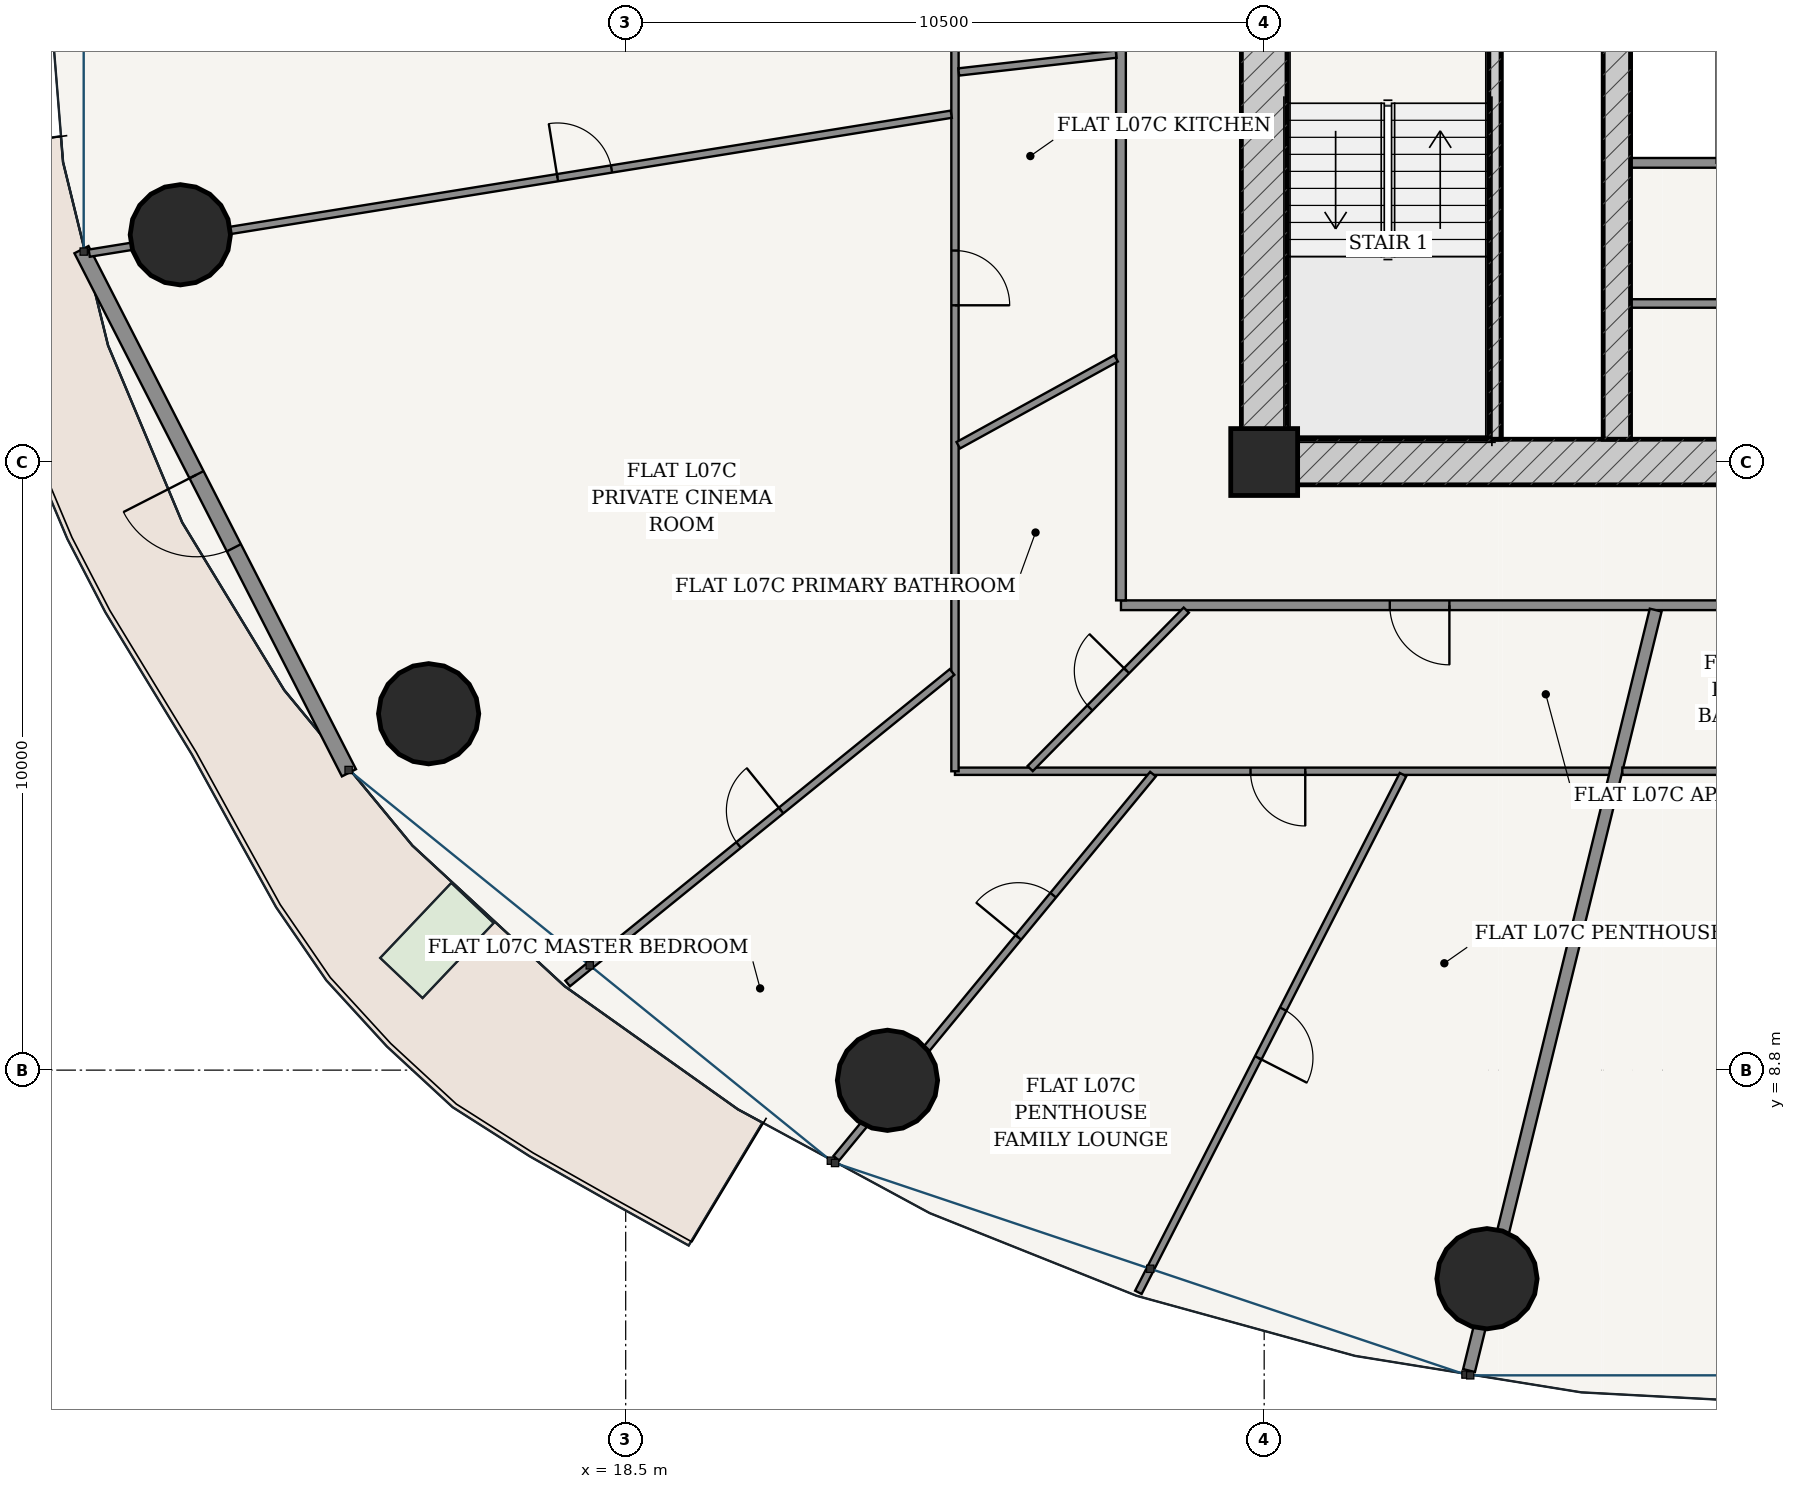
"""IFC4 building model, lengths in metres.
Left out: names, types, materials, properties, quantities, classifications, styles, units other than length and angle.
Written with IfcOpenShell. Run it as: python <this file> out.ifc"""

import sys

from ifc_helpers import new_model, si_unit, direction, frame, frame_2d, origin, origin_2d, place, context, subcontext, project, spatial, rectangle, hollow_circle, extrude, source, transform, mapped, element, fill, save


model = new_model("IFC4")
c1 = context("Model", 3, precision=1e-05, world=origin(), true_north=direction((-0.2419218956, 0.970295726276)))
c2 = subcontext(c1, "Body", "Model", "MODEL_VIEW")
j1 = project(units=[si_unit("LENGTHUNIT", "METRE"), si_unit("PLANEANGLEUNIT", "RADIAN")], contexts=[c1])
p1 = place(None, origin())
s1 = spatial("IfcSite", under=j1, at=p1, CompositionType="ELEMENT")
p2 = place(p1, origin())
s2 = spatial("IfcBuilding", under=s1, at=p2, CompositionType="ELEMENT")
p3 = place(p2, frame((0.0, 0.0, 31.2)))
s3 = spatial("IfcBuildingStorey", under=s2, at=p3, CompositionType="ELEMENT", Elevation=31.2)
p4 = place(p3, frame((29.0, 18.8, 0.0), z_axis=(0.0, 0.0, 1.0), x_axis=(1.0, 0.0, 0.0)))
e1 = element("IfcColumn", 1, at=p4, inside=s3, PredefinedType="COLUMN", context=c2, shape_type="SweptSolid", body=[
    extrude(rectangle(XDim=1.1, YDim=1.1, at=origin_2d()), origin(), (0.0, 0.0, 1.0), 3.6),
])
p5 = place(p3, frame((28.625, 18.8, 0.0), z_axis=(0.0, 0.0, 1.0), x_axis=(1.0, 0.0, 0.0)))
e2 = element("IfcWall", 2, at=p5, inside=s3, PredefinedType="SHEAR", context=c2, shape_type="SweptSolid", body=[
    extrude(rectangle(XDim=18.75, YDim=0.75, at=frame_2d((9.375, 0.0))), origin(), (0.0, 0.0, 1.0), 3.32),
])
p6 = place(p5, frame((8.95, 0.0, 0.0)))
e3 = element("IfcOpeningElement", 3, at=p6, cuts=e2, PredefinedType="OPENING", context=c2, shape_type="SweptSolid", body=[
    extrude(rectangle(XDim=0.85, YDim=2.1, at=frame_2d((0.425, 1.05))), frame((0.0, 0.385, 0.0), z_axis=(0.0, -1.0, 0.0), x_axis=(1.0, 0.0, 0.0)), (0.0, 0.0, 1.0), 0.77),
])
p7 = place(p3, frame((29.0, 19.175, 0.0), z_axis=(0.0, 0.0, 1.0), x_axis=(0.0, 1.0, 0.0)))
e4 = element("IfcWall", 4, at=p7, inside=s3, PredefinedType="SHEAR", context=c2, shape_type="SweptSolid", body=[
    extrude(rectangle(XDim=15.25, YDim=0.75, at=frame_2d((7.625, 0.0))), origin(), (0.0, 0.0, 1.0), 3.32),
])
p8 = place(p7, frame((9.875, 0.0, 0.0)))
e5 = element("IfcOpeningElement", 5, at=p8, cuts=e4, PredefinedType="OPENING", context=c2, shape_type="SweptSolid", body=[
    extrude(rectangle(XDim=1.5, YDim=2.2, at=frame_2d((0.75, 1.1))), frame((0.0, 0.385, 0.0), z_axis=(0.0, -1.0, 0.0), x_axis=(1.0, 0.0, 0.0)), (0.0, 0.0, 1.0), 0.77),
])
p9 = place(p3, frame((32.795, 19.175, 0.0), z_axis=(0.0, 0.0, 1.0), x_axis=(0.0, 1.0, 0.0)))
e6 = element("IfcWall", 6, at=p9, inside=s3, PredefinedType="SOLIDWALL", context=c2, shape_type="SweptSolid", body=[
    extrude(rectangle(XDim=7.375, YDim=0.2, at=frame_2d((3.688, 0.0))), origin(), (0.0, 0.0, 1.0), 3.32),
])
p10 = place(p3, frame((34.8, 19.175, 0.0), z_axis=(0.0, 0.0, 1.0), x_axis=(0.0, 1.0, 0.0)))
e7 = element("IfcWall", 7, at=p10, inside=s3, PredefinedType="SHEAR", context=c2, shape_type="SweptSolid", body=[
    extrude(rectangle(XDim=15.25, YDim=0.45, at=frame_2d((7.625, 0.0))), origin(), (0.0, 0.0, 1.0), 3.32),
])
p11 = place(p10, frame((7.8, 0.0, 0.0)))
e8 = element("IfcOpeningElement", 8, at=p11, cuts=e7, PredefinedType="OPENING", context=c2, shape_type="SweptSolid", body=[
    extrude(rectangle(XDim=1.05, YDim=2.15, at=frame_2d((0.525, 1.075))), frame((0.0, 0.235, 0.0), z_axis=(0.0, -1.0, 0.0), x_axis=(1.0, 0.0, 0.0)), (0.0, 0.0, 1.0), 0.47),
])
for number, where, z_axis, x_axis in (
    (9, (11.176, 22.537, 0.0), (0.0, 0.0, 1.0), (1.0, 0.0, 0.0)),
    (10, (15.259, 14.661, 0.0), (0.0, 0.0, 1.0), (1.0, 0.0, 0.0)),
    (11, (22.805, 8.632, 0.0), (0.0, 0.0, 1.0), (1.0, 0.0, 0.0)),
    (12, (32.664, 5.37, 0.0), (0.0, 0.0, 1.0), (1.0, 0.0, 0.0)),
):
    element("IfcColumn", number, at=place(p3, frame(where, z_axis=z_axis, x_axis=x_axis)), inside=s3, PredefinedType="COLUMN", context=c2, shape_type="SweptSolid", body=[
        extrude(hollow_circle(Radius=0.825, WallThickness=0.05, at=origin_2d()), origin(), (0.0, 0.0, 1.0), 3.6),
    ])
p12 = place(p3, frame((9.55, 22.292, 0.0), z_axis=(0.0, 0.0, 1.0), x_axis=(0.455220575541, -0.890378698984, 0.0)))
e13 = element("IfcWall", 13, at=p12, inside=s3, PredefinedType="SOLIDWALL", context=c2, shape_type="SweptSolid", body=[
    extrude(rectangle(XDim=9.662, YDim=0.26, at=frame_2d((4.831, 0.0))), origin(), (0.0, 0.0, 1.0), 3.32),
])
p13 = place(p12, frame((4.156, 0.0, 0.0)))
e14 = element("IfcOpeningElement", 14, at=p13, cuts=e13, PredefinedType="OPENING", context=c2, shape_type="SweptSolid", body=[
    extrude(rectangle(XDim=1.35, YDim=2.2, at=frame_2d((0.675, 1.1))), frame((0.0, 0.14, 0.0), z_axis=(0.0, -1.0, 0.0), x_axis=(1.0, 0.0, 0.0)), (0.0, 0.0, 1.0), 0.28),
])
p14 = place(p3, frame((35.025, 23.72, 0.0), z_axis=(0.0, 0.0, 1.0), x_axis=(1.0, 0.0, 0.0)))
e15 = element("IfcWall", 15, at=p14, inside=s3, PredefinedType="PARTITIONING", context=c2, shape_type="SweptSolid", body=[
    extrude(rectangle(XDim=5.95, YDim=0.16, at=frame_2d((2.975, 0.0))), origin(), (0.0, 0.0, 1.0), 3.32),
])
p15 = place(p3, frame((35.025, 21.407, 0.0), z_axis=(0.0, 0.0, 1.0), x_axis=(1.0, 0.0, 0.0)))
e16 = element("IfcWall", 16, at=p15, inside=s3, PredefinedType="PARTITIONING", context=c2, shape_type="SweptSolid", body=[
    extrude(rectangle(XDim=5.95, YDim=0.14, at=frame_2d((2.975, 0.0))), origin(), (0.0, 0.0, 1.0), 3.32),
])
p16 = place(p15, frame((2.55, 0.0, 0.0)))
e17 = element("IfcOpeningElement", 17, at=p16, cuts=e16, PredefinedType="OPENING", context=c2, shape_type="SweptSolid", body=[
    extrude(rectangle(XDim=0.85, YDim=2.1, at=frame_2d((0.425, 1.05))), frame((0.0, 0.08, 0.0), z_axis=(0.0, -1.0, 0.0), x_axis=(1.0, 0.0, 0.0)), (0.0, 0.0, 1.0), 0.16),
])
p17 = place(p3, frame((26.645, 16.445, 0.0), z_axis=(0.0, 0.0, 1.0), x_axis=(1.0, 0.0, 0.0)))
e18 = element("IfcWall", 18, at=p17, inside=s3, PredefinedType="PARTITIONING", context=c2, shape_type="SweptSolid", body=[
    extrude(rectangle(XDim=22.71, YDim=0.16, at=frame_2d((11.355, 0.0))), origin(), (0.0, 0.0, 1.0), 2.688),
])
p18 = place(p17, frame((4.421, 0.0, 0.0)))
e19 = element("IfcOpeningElement", 19, at=p18, cuts=e18, PredefinedType="OPENING", context=c2, shape_type="SweptSolid", body=[
    extrude(rectangle(XDim=0.98, YDim=2.2, at=frame_2d((0.49, 1.1))), frame((0.0, 0.09, 0.0), z_axis=(0.0, -1.0, 0.0), x_axis=(1.0, 0.0, 0.0)), (0.0, 0.0, 1.0), 0.18),
])
p19 = place(p17, frame((16.153, 0.0, 0.0)))
e20 = element("IfcOpeningElement", 20, at=p19, cuts=e18, PredefinedType="OPENING", context=c2, shape_type="SweptSolid", body=[
    extrude(rectangle(XDim=0.98, YDim=2.2, at=frame_2d((0.49, 1.1))), frame((0.0, 0.09, 0.0), z_axis=(0.0, -1.0, 0.0), x_axis=(1.0, 0.0, 0.0)), (0.0, 0.0, 1.0), 0.18),
])
p20 = place(p3, frame((26.645, 16.525, 0.0), z_axis=(0.0, 0.0, 1.0), x_axis=(0.0, 1.0, 0.0)))
e21 = element("IfcWall", 21, at=p20, inside=s3, PredefinedType="PARTITIONING", context=c2, shape_type="SweptSolid", body=[
    extrude(rectangle(XDim=20.55, YDim=0.16, at=frame_2d((10.275, 0.0))), origin(), (0.0, 0.0, 1.0), 2.688),
])
p21 = place(p3, frame((34.686, 13.715, 0.0), z_axis=(0.0, 0.0, 1.0), x_axis=(-1.0, 0.0, 0.0)))
e22 = element("IfcWall", 22, at=p21, inside=s3, PredefinedType="PARTITIONING", context=c2, shape_type="SweptSolid", body=[
    extrude(rectangle(XDim=10.771, YDim=0.12, at=frame_2d((5.385, 0.0))), origin(), (0.0, 0.0, 1.0), 2.688),
])
p22 = place(p21, frame((5.01, 0.0, 0.0)))
e23 = element("IfcOpeningElement", 23, at=p22, cuts=e22, PredefinedType="OPENING", context=c2, shape_type="SweptSolid", body=[
    extrude(rectangle(XDim=0.9, YDim=2.15, at=frame_2d((0.45, 1.075))), frame((0.0, 0.07, 0.0), z_axis=(0.0, -1.0, 0.0), x_axis=(1.0, 0.0, 0.0)), (0.0, 0.0, 1.0), 0.14),
])
p23 = place(p3, frame((23.915, 13.715, 0.0), z_axis=(0.0, 0.0, 1.0), x_axis=(0.0, 1.0, 0.0)))
e24 = element("IfcWall", 24, at=p23, inside=s3, PredefinedType="PARTITIONING", context=c2, shape_type="SweptSolid", body=[
    extrude(rectangle(XDim=15.253, YDim=0.12, at=frame_2d((7.626, 0.0))), origin(), (0.0, 0.0, 1.0), 2.688),
])
p24 = place(p23, frame((7.663, 0.0, 0.0)))
e25 = element("IfcOpeningElement", 25, at=p24, cuts=e24, PredefinedType="OPENING", context=c2, shape_type="SweptSolid", body=[
    extrude(rectangle(XDim=0.9, YDim=2.15, at=frame_2d((0.45, 1.075))), frame((0.0, 0.07, 0.0), z_axis=(0.0, -1.0, 0.0), x_axis=(1.0, 0.0, 0.0)), (0.0, 0.0, 1.0), 0.14),
])
p25 = place(p23, frame((12.803, 0.0, 0.0)))
e26 = element("IfcOpeningElement", 26, at=p25, cuts=e24, PredefinedType="OPENING", context=c2, shape_type="SweptSolid", body=[
    extrude(rectangle(XDim=0.9, YDim=2.15, at=frame_2d((0.45, 1.075))), frame((0.0, 0.07, 0.0), z_axis=(0.0, -1.0, 0.0), x_axis=(1.0, 0.0, 0.0)), (0.0, 0.0, 1.0), 0.14),
])
p26 = place(p3, frame((23.854, 24.52, 0.0), z_axis=(0.0, 0.0, 1.0), x_axis=(-0.987258444847, -0.159124991997, 0.0)))
e27 = element("IfcWall", 27, at=p26, inside=s3, PredefinedType="PARTITIONING", context=c2, shape_type="SweptSolid", body=[
    extrude(rectangle(XDim=14.359, YDim=0.12, at=frame_2d((7.18, 0.0))), origin(), (0.0, 0.0, 1.0), 2.688),
])
p27 = place(p26, frame((5.659, 0.0, 0.0)))
e28 = element("IfcOpeningElement", 28, at=p27, cuts=e27, PredefinedType="OPENING", context=c2, shape_type="SweptSolid", body=[
    extrude(rectangle(XDim=0.9, YDim=2.15, at=frame_2d((0.45, 1.075))), frame((0.0, 0.07, 0.0), z_axis=(0.0, -1.0, 0.0), x_axis=(1.0, 0.0, 0.0)), (0.0, 0.0, 1.0), 0.14),
])
p28 = place(p3, frame((23.867, 15.347, 0.0), z_axis=(0.0, 0.0, 1.0), x_axis=(-0.776936623447, -0.629578814087, 0.0)))
e29 = element("IfcWall", 29, at=p28, inside=s3, PredefinedType="PARTITIONING", context=c2, shape_type="SweptSolid", body=[
    extrude(rectangle(XDim=8.136, YDim=0.12, at=frame_2d((4.068, 0.0))), origin(), (0.0, 0.0, 1.0), 2.762),
])
p29 = place(p28, frame((3.618, 0.0, 0.0)))
e30 = element("IfcOpeningElement", 30, at=p29, cuts=e29, PredefinedType="OPENING", context=c2, shape_type="SweptSolid", body=[
    extrude(rectangle(XDim=0.9, YDim=2.15, at=frame_2d((0.45, 1.075))), frame((0.0, 0.07, 0.0), z_axis=(0.0, -1.0, 0.0), x_axis=(1.0, 0.0, 0.0)), (0.0, 0.0, 1.0), 0.14),
])
p30 = place(p3, frame((27.171, 13.667, 0.0), z_axis=(0.0, 0.0, 1.0), x_axis=(-0.636177533893, -0.771542704826, 0.0)))
e31 = element("IfcWall", 31, at=p30, inside=s3, PredefinedType="PARTITIONING", context=c2, shape_type="SweptSolid", body=[
    extrude(rectangle(XDim=8.187, YDim=0.12, at=frame_2d((4.093, 0.0))), origin(), (0.0, 0.0, 1.0), 2.688),
])
p31 = place(p30, frame((2.579, 0.0, 0.0)))
e32 = element("IfcOpeningElement", 32, at=p31, cuts=e31, PredefinedType="OPENING", context=c2, shape_type="SweptSolid", body=[
    extrude(rectangle(XDim=0.9, YDim=2.15, at=frame_2d((0.45, 1.075))), frame((0.0, 0.07, 0.0), z_axis=(0.0, -1.0, 0.0), x_axis=(1.0, 0.0, 0.0)), (0.0, 0.0, 1.0), 0.14),
])
p32 = place(p3, frame((31.283, 13.66, 0.0), z_axis=(0.0, 0.0, 1.0), x_axis=(-0.455131303234, -0.890424335256, 0.0)))
e33 = element("IfcWall", 33, at=p32, inside=s3, PredefinedType="PARTITIONING", context=c2, shape_type="SweptSolid", body=[
    extrude(rectangle(XDim=9.562, YDim=0.12, at=frame_2d((4.781, 0.0))), origin(), (0.0, 0.0, 1.0), 2.762),
])
p33 = place(p32, frame((4.331, 0.0, 0.0)))
e34 = element("IfcOpeningElement", 34, at=p33, cuts=e33, PredefinedType="OPENING", context=c2, shape_type="SweptSolid", body=[
    extrude(rectangle(XDim=0.9, YDim=2.15, at=frame_2d((0.45, 1.075))), frame((0.0, 0.07, 0.0), z_axis=(0.0, -1.0, 0.0), x_axis=(1.0, 0.0, 0.0)), (0.0, 0.0, 1.0), 0.14),
])
p34 = place(p3, frame((26.565, 25.507, 0.0), z_axis=(0.0, 0.0, 1.0), x_axis=(-0.993676271227, -0.112282981789, 0.0)))
e35 = element("IfcWall", 35, at=p34, inside=s3, PredefinedType="PARTITIONING", context=c2, shape_type="SweptSolid", body=[
    extrude(rectangle(XDim=2.605, YDim=0.12, at=frame_2d((1.302, 0.0))), origin(), (0.0, 0.0, 1.0), 3.32),
])
p35 = place(p3, frame((26.565, 20.505, 0.0), z_axis=(0.0, 0.0, 1.0), x_axis=(-0.876027961584, -0.482260314066, 0.0)))
e36 = element("IfcWall", 36, at=p35, inside=s3, PredefinedType="PARTITIONING", context=c2, shape_type="SweptSolid", body=[
    extrude(rectangle(XDim=2.963, YDim=0.12, at=frame_2d((1.481, 0.0))), origin(), (0.0, 0.0, 1.0), 2.688),
])
p36 = place(p3, frame((27.719, 16.365, 0.0), z_axis=(0.0, 0.0, 1.0), x_axis=(-0.701848204267, -0.712326539002, 0.0)))
e37 = element("IfcWall", 37, at=p36, inside=s3, PredefinedType="PARTITIONING", context=c2, shape_type="SweptSolid", body=[
    extrude(rectangle(XDim=3.658, YDim=0.12, at=frame_2d((1.829, 0.0))), origin(), (0.0, 0.0, 1.0), 2.688),
])
p37 = place(p36, frame((1.399, 0.0, 0.0)))
e38 = element("IfcOpeningElement", 38, at=p37, cuts=e37, PredefinedType="OPENING", context=c2, shape_type="SweptSolid", body=[
    extrude(rectangle(XDim=0.86, YDim=2.15, at=frame_2d((0.43, 1.075))), frame((0.0, 0.07, 0.0), z_axis=(0.0, -1.0, 0.0), x_axis=(1.0, 0.0, 0.0)), (0.0, 0.0, 1.0), 0.14),
])
p38 = place(p3, frame((35.438, 16.365, 0.0), z_axis=(0.0, 0.0, 1.0), x_axis=(-0.238380116209, -0.971171931326, 0.0)))
e39 = element("IfcWall", 39, at=p38, inside=s3, PredefinedType="PARTITIONING", context=c2, shape_type="SweptSolid", body=[
    extrude(rectangle(XDim=12.877, YDim=0.2, at=frame_2d((6.438, 0.0))), origin(), (0.0, 0.0, 1.0), 2.688),
])
p39 = place(p3, frame((52.085, 13.715, 0.0), z_axis=(0.0, 0.0, 1.0), x_axis=(-1.0, 0.0, 0.0)))
e40 = element("IfcWall", 40, at=p39, inside=s3, PredefinedType="PARTITIONING", context=c2, shape_type="SweptSolid", body=[
    extrude(rectangle(XDim=17.195, YDim=0.12, at=frame_2d((8.597, 0.0))), origin(), (0.0, 0.0, 1.0), 2.688),
])
p40 = place(p39, frame((9.191, 0.0, 0.0)))
e41 = element("IfcOpeningElement", 41, at=p40, cuts=e40, PredefinedType="OPENING", context=c2, shape_type="SweptSolid", body=[
    extrude(rectangle(XDim=0.9, YDim=2.15, at=frame_2d((0.45, 1.075))), frame((0.0, 0.07, 0.0), z_axis=(0.0, -1.0, 0.0), x_axis=(1.0, 0.0, 0.0)), (0.0, 0.0, 1.0), 0.14),
])
m1 = source(origin(), c2, "Body", "SweptSolid", [
    extrude(rectangle(XDim=1.35, YDim=2.2, at=frame_2d((0.675, 1.1))), frame((0.0, 0.025, 0.0), z_axis=(0.0, -1.0, 0.0), x_axis=(1.0, 0.0, 0.0)), (0.0, 0.0, 1.0), 0.05),
])
p41 = place(p13, frame((1.35, 0.0, 0.0), z_axis=(0.0, 0.0, 1.0), x_axis=(-1.0, 0.0, 0.0)))
e42 = element("IfcDoor", 42, at=p41, inside=s3, OperationType="SINGLE_SWING_RIGHT", PredefinedType="DOOR", context=c2, shape_type="MappedRepresentation", body=[
    mapped(m1, transform((0.0, 0.0, 0.0), scale=1.0)),
])
fill(e14, e42)
m2 = source(origin(), c2, "Body", "SweptSolid", [
    extrude(rectangle(XDim=0.98, YDim=2.2, at=frame_2d((0.49, 1.1))), frame((0.0, 0.025, 0.0), z_axis=(0.0, -1.0, 0.0), x_axis=(1.0, 0.0, 0.0)), (0.0, 0.0, 1.0), 0.05),
])
p42 = place(p18, frame((0.98, 0.0, 0.0), z_axis=(0.0, 0.0, 1.0), x_axis=(-1.0, 0.0, 0.0)))
e43 = element("IfcDoor", 43, at=p42, inside=s3, OperationType="SINGLE_SWING_LEFT", PredefinedType="DOOR", context=c2, shape_type="MappedRepresentation", body=[
    mapped(m2, transform((0.0, 0.0, 0.0), scale=1.0)),
])
fill(e19, e43)
m3 = source(origin(), c2, "Body", "SweptSolid", [
    extrude(rectangle(XDim=0.86, YDim=2.15, at=frame_2d((0.43, 1.075))), frame((0.0, 0.025, 0.0), z_axis=(0.0, -1.0, 0.0), x_axis=(1.0, 0.0, 0.0)), (0.0, 0.0, 1.0), 0.05),
])
p43 = place(p37, frame((0.86, 0.0, 0.0), z_axis=(0.0, 0.0, 1.0), x_axis=(-1.0, 0.0, 0.0)))
e44 = element("IfcDoor", 44, at=p43, inside=s3, OperationType="SINGLE_SWING_RIGHT", PredefinedType="DOOR", context=c2, shape_type="MappedRepresentation", body=[
    mapped(m3, transform((0.0, 0.0, 0.0), scale=1.0)),
])
fill(e38, e44)
m4 = source(origin(), c2, "Body", "SweptSolid", [
    extrude(rectangle(XDim=0.9, YDim=2.15, at=frame_2d((0.45, 1.075))), frame((0.0, 0.025, 0.0), z_axis=(0.0, -1.0, 0.0), x_axis=(1.0, 0.0, 0.0)), (0.0, 0.0, 1.0), 0.05),
])
p44 = place(p22, origin())
e45 = element("IfcDoor", 45, at=p44, inside=s3, OperationType="SINGLE_SWING_LEFT", PredefinedType="DOOR", context=c2, shape_type="MappedRepresentation", body=[
    mapped(m4, transform((0.0, 0.0, 0.0), scale=1.0)),
])
fill(e23, e45)
p45 = place(p33, origin())
e46 = element("IfcDoor", 46, at=p45, inside=s3, OperationType="SINGLE_SWING_RIGHT", PredefinedType="DOOR", context=c2, shape_type="MappedRepresentation", body=[
    mapped(m4, transform((0.0, 0.0, 0.0), scale=1.0)),
])
fill(e34, e46)
p46 = place(p31, frame((0.9, 0.0, 0.0), z_axis=(0.0, 0.0, 1.0), x_axis=(-1.0, 0.0, 0.0)))
e47 = element("IfcDoor", 47, at=p46, inside=s3, OperationType="SINGLE_SWING_LEFT", PredefinedType="DOOR", context=c2, shape_type="MappedRepresentation", body=[
    mapped(m4, transform((0.0, 0.0, 0.0), scale=1.0)),
])
fill(e32, e47)
p47 = place(p29, frame((0.9, 0.0, 0.0), z_axis=(0.0, 0.0, 1.0), x_axis=(-1.0, 0.0, 0.0)))
e48 = element("IfcDoor", 48, at=p47, inside=s3, OperationType="SINGLE_SWING_RIGHT", PredefinedType="DOOR", context=c2, shape_type="MappedRepresentation", body=[
    mapped(m4, transform((0.0, 0.0, 0.0), scale=1.0)),
])
fill(e30, e48)
p48 = place(p27, frame((0.9, 0.0, 0.0), z_axis=(0.0, 0.0, 1.0), x_axis=(-1.0, 0.0, 0.0)))
e49 = element("IfcDoor", 49, at=p48, inside=s3, OperationType="SINGLE_SWING_LEFT", PredefinedType="DOOR", context=c2, shape_type="MappedRepresentation", body=[
    mapped(m4, transform((0.0, 0.0, 0.0), scale=1.0)),
])
fill(e28, e49)
p49 = place(p24, frame((0.9, 0.0, 0.0), z_axis=(0.0, 0.0, 1.0), x_axis=(-1.0, 0.0, 0.0)))
e50 = element("IfcDoor", 50, at=p49, inside=s3, OperationType="SINGLE_SWING_RIGHT", PredefinedType="DOOR", context=c2, shape_type="MappedRepresentation", body=[
    mapped(m4, transform((0.0, 0.0, 0.0), scale=1.0)),
])
fill(e25, e50)
save(model, sys.argv[1])
